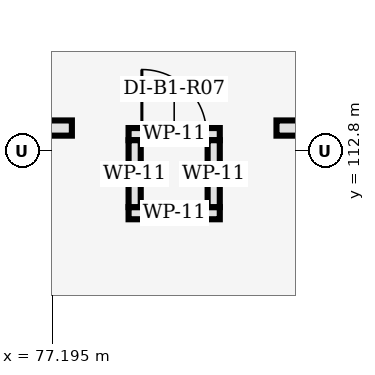
"""IFC4 building model, lengths in metres.
Left out: names, types, materials, properties, quantities, classifications, styles, units other than length and angle.
Written with IfcOpenShell. Run it as: python <this file> out.ifc"""

import sys

from ifc_helpers import new_model, si_unit, direction, frame, frame_2d, origin, place, context, subcontext, project, spatial, rectangle, extrude, element, fill, save


model = new_model("IFC4")
c1 = context("Model", 3, precision=1e-05, world=origin(), true_north=direction((0.0, 1.0)))
c2 = subcontext(c1, "Body", "Model", "MODEL_VIEW")
j1 = project(units=[si_unit("LENGTHUNIT", "METRE"), si_unit("PLANEANGLEUNIT", "RADIAN")], contexts=[c1])
p1 = place(None, origin())
s1 = spatial("IfcSite", under=j1, at=p1, CompositionType="ELEMENT")
p2 = place(p1, origin())
s2 = spatial("IfcBuilding", under=s1, at=p2, CompositionType="ELEMENT")
p3 = place(p2, frame((0.0, 0.0, -4.5)))
s3 = spatial("IfcBuildingStorey", under=s2, at=p3, CompositionType="ELEMENT", Elevation=-4.5)
p4 = place(p3, frame((78.2, 111.98, 0.0), z_axis=(0.0, 0.0, 1.0), x_axis=(1.0, 0.0, 0.0)))
e1 = element("IfcWall", 1, at=p4, inside=s3, PredefinedType="PARTITIONING", context=c2, shape_type="SweptSolid", body=[
    extrude(rectangle(XDim=1.2, YDim=0.16, at=frame_2d((0.6, 0.0))), origin(), (0.0, 0.0, 1.0), 4.15),
])
p5 = place(p3, frame((78.2, 113.02, 0.0), z_axis=(0.0, 0.0, 1.0), x_axis=(1.0, 0.0, 0.0)))
e2 = element("IfcWall", 2, at=p5, inside=s3, PredefinedType="PARTITIONING", context=c2, shape_type="SweptSolid", body=[
    extrude(rectangle(XDim=1.2, YDim=0.16, at=frame_2d((0.6, 0.0))), origin(), (0.0, 0.0, 1.0), 4.15),
])
p6 = place(p5, frame((0.175, 0.0, 0.0)))
e3 = element("IfcOpeningElement", 3, at=p6, cuts=e2, PredefinedType="OPENING", context=c2, shape_type="SweptSolid", body=[
    extrude(rectangle(XDim=0.85, YDim=2.02, at=frame_2d((0.425, 1.01))), frame((0.0, 0.09, 0.0), z_axis=(0.0, -1.0, 0.0), x_axis=(1.0, 0.0, 0.0)), (0.0, 0.0, 1.0), 0.18),
])
for number, where, z_axis, x_axis in (
    (4, (78.28, 112.06, 0.0), (0.0, 0.0, 1.0), (0.0, 1.0, 0.0)),
    (5, (79.32, 112.06, 0.0), (0.0, 0.0, 1.0), (0.0, 1.0, 0.0)),
):
    element("IfcWall", number, at=place(p3, frame(where, z_axis=z_axis, x_axis=x_axis)), inside=s3, PredefinedType="PARTITIONING", context=c2, shape_type="SweptSolid", body=[
        extrude(rectangle(XDim=0.88, YDim=0.16, at=frame_2d((0.44, 0.0))), origin(), (0.0, 0.0, 1.0), 4.15),
    ])
p7 = place(p3, frame((80.146, 113.1, 0.0), z_axis=(0.0, 0.0, 1.0), x_axis=(1.0, 0.0, 0.0)))
e6 = element("IfcWall", 6, at=p7, inside=s3, PredefinedType="PARTITIONING", context=c2, shape_type="SweptSolid", body=[
    extrude(rectangle(XDim=13.313, YDim=0.2, at=frame_2d((6.656, 0.0))), origin(), (0.0, 0.0, 1.0), 3.235),
])
p8 = place(p3, frame((75.387, 113.1, 0.0), z_axis=(0.0, 0.0, 1.0), x_axis=(1.0, 0.0, 0.0)))
e7 = element("IfcWall", 7, at=p8, inside=s3, PredefinedType="PARTITIONING", context=c2, shape_type="SweptSolid", body=[
    extrude(rectangle(XDim=2.067, YDim=0.2, at=frame_2d((1.034, 0.0))), origin(), (0.0, 0.0, 1.0), 3.485),
])
p9 = place(p6, origin())
e8 = element("IfcDoor", 8, at=p9, inside=s3, OperationType="SINGLE_SWING_LEFT", PredefinedType="DOOR", context=c2, shape_type="SweptSolid", body=[
    extrude(rectangle(XDim=0.85, YDim=2.02, at=frame_2d((0.425, 1.01))), frame((0.0, 0.025, 0.0), z_axis=(0.0, -1.0, 0.0), x_axis=(1.0, 0.0, 0.0)), (0.0, 0.0, 1.0), 0.05),
])
fill(e3, e8)
save(model, sys.argv[1])
